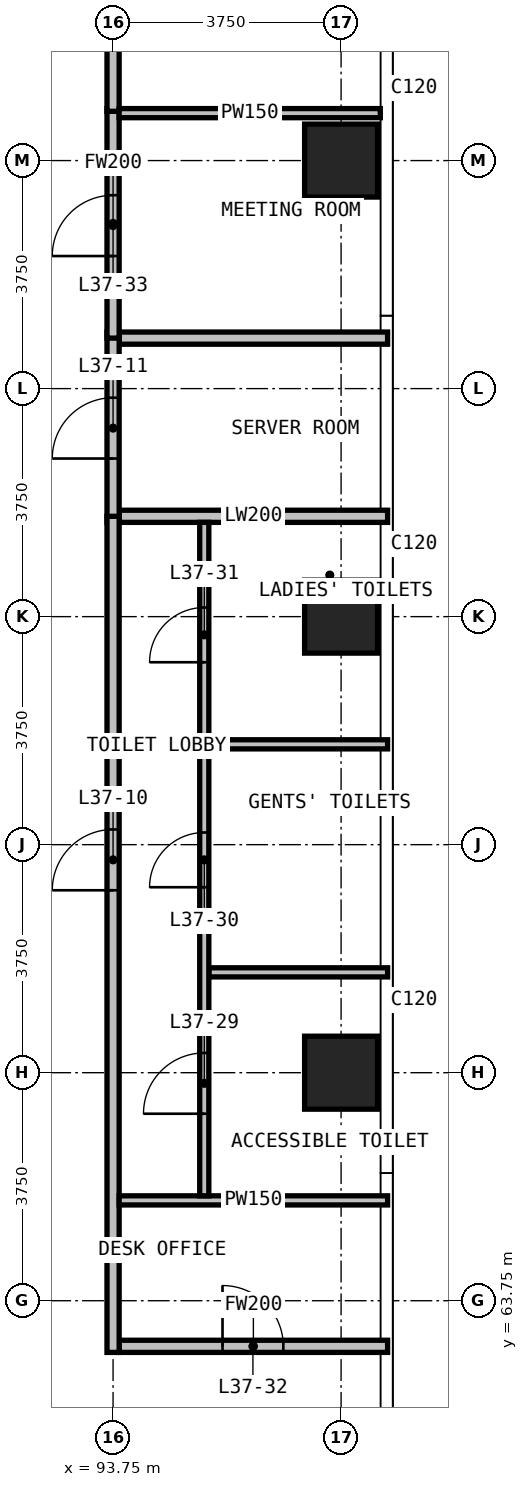
"""IFC4 building model, lengths in metres.
Left out: names, types, materials, properties, quantities, classifications, styles, units other than length and angle.
Written with IfcOpenShell. Run it as: python <this file> out.ifc"""

import sys

from ifc_helpers import new_model, si_unit, direction, frame, frame_2d, origin, origin_2d, place, context, subcontext, project, spatial, rectangle, extrude, element, fill, save


model = new_model("IFC4")
c1 = context("Model", 3, precision=1e-05, world=origin(), true_north=direction((0.0, 1.0)))
c2 = subcontext(c1, "Body", "Model", "MODEL_VIEW")
j1 = project(units=[si_unit("LENGTHUNIT", "METRE"), si_unit("PLANEANGLEUNIT", "RADIAN")], contexts=[c1])
p1 = place(None, origin())
s1 = spatial("IfcSite", under=j1, at=p1, CompositionType="ELEMENT")
p2 = place(p1, origin())
s2 = spatial("IfcBuilding", under=s1, at=p2, CompositionType="ELEMENT")
p3 = place(p2, frame((0.0, 0.0, 147.7)))
s3 = spatial("IfcBuildingStorey", under=s2, at=p3, CompositionType="ELEMENT", Elevation=147.7)
for number, where, z_axis, x_axis in (
    (1, (97.5, 67.5, 0.0), (0.0, 0.0, 1.0), (1.0, 0.0, 0.0)),
    (2, (97.5, 75.0, 0.0), (0.0, 0.0, 1.0), (1.0, 0.0, 0.0)),
    (3, (97.5, 82.5, 0.0), (0.0, 0.0, 1.0), (1.0, 0.0, 0.0)),
):
    element("IfcColumn", number, at=place(p3, frame(where, z_axis=z_axis, x_axis=x_axis)), inside=s3, PredefinedType="COLUMN", context=c2, shape_type="SweptSolid", body=[
        extrude(rectangle(XDim=1.2, YDim=1.2, at=origin_2d()), origin(), (0.0, 0.0, 1.0), 3.6),
    ])
for number, where, z_axis, x_axis in (
    (4, (93.85, 76.65, 0.0), (0.0, 0.0, 1.0), (1.0, 0.0, 0.0)),
    (5, (93.85, 79.58, 0.0), (0.0, 0.0, 1.0), (1.0, 0.0, 0.0)),
):
    element("IfcWall", number, at=place(p3, frame(where, z_axis=z_axis, x_axis=x_axis)), inside=s3, PredefinedType="PARTITIONING", context=c2, shape_type="SweptSolid", body=[
        extrude(rectangle(XDim=4.415, YDim=0.2, at=frame_2d((2.208, 0.0))), origin(), (0.0, 0.0, 1.0), 3.3),
    ])
p4 = place(p3, frame((93.75, 76.55, 0.0), z_axis=(0.0, 0.0, 1.0), x_axis=(0.0, 1.0, 0.0)))
e6 = element("IfcWall", 6, at=p4, inside=s3, PredefinedType="PARTITIONING", context=c2, shape_type="SweptSolid", body=[
    extrude(rectangle(XDim=3.13, YDim=0.2, at=frame_2d((1.565, 0.0))), origin(), (0.0, 0.0, 1.0), 3.3),
])
p5 = place(p4, frame((1.05, 0.0, 0.0)))
e7 = element("IfcOpeningElement", 7, at=p5, cuts=e6, PredefinedType="OPENING", context=c2, shape_type="SweptSolid", body=[
    extrude(rectangle(XDim=1.0, YDim=2.2, at=frame_2d((0.5, 1.1))), frame((0.0, 0.11, 0.0), z_axis=(0.0, -1.0, 0.0), x_axis=(1.0, 0.0, 0.0)), (0.0, 0.0, 1.0), 0.22),
])
p6 = place(p3, frame((93.85, 63.0, 0.0), z_axis=(0.0, 0.0, 1.0), x_axis=(1.0, 0.0, 0.0)))
e8 = element("IfcWall", 8, at=p6, inside=s3, PredefinedType="PARTITIONING", context=c2, shape_type="SweptSolid", body=[
    extrude(rectangle(XDim=4.415, YDim=0.2, at=frame_2d((2.208, 0.0))), origin(), (0.0, 0.0, 1.0), 3.3),
])
p7 = place(p6, frame((1.7, 0.0, 0.0)))
e9 = element("IfcOpeningElement", 9, at=p7, cuts=e8, PredefinedType="OPENING", context=c2, shape_type="SweptSolid", body=[
    extrude(rectangle(XDim=1.0, YDim=2.2, at=frame_2d((0.5, 1.1))), frame((0.0, 0.11, 0.0), z_axis=(0.0, -1.0, 0.0), x_axis=(1.0, 0.0, 0.0)), (0.0, 0.0, 1.0), 0.22),
])
p8 = place(p3, frame((93.75, 62.9, 0.0), z_axis=(0.0, 0.0, 1.0), x_axis=(0.0, 1.0, 0.0)))
e10 = element("IfcWall", 10, at=p8, inside=s3, PredefinedType="PARTITIONING", context=c2, shape_type="SweptSolid", body=[
    extrude(rectangle(XDim=13.75, YDim=0.2, at=frame_2d((6.875, 0.0))), origin(), (0.0, 0.0, 1.0), 3.3),
])
p9 = place(p8, frame((7.6, 0.0, 0.0)))
e11 = element("IfcOpeningElement", 11, at=p9, cuts=e10, PredefinedType="OPENING", context=c2, shape_type="SweptSolid", body=[
    extrude(rectangle(XDim=1.0, YDim=2.2, at=frame_2d((0.5, 1.1))), frame((0.0, 0.11, 0.0), z_axis=(0.0, -1.0, 0.0), x_axis=(1.0, 0.0, 0.0)), (0.0, 0.0, 1.0), 0.22),
])
p10 = place(p3, frame((93.75, 79.58, 0.0), z_axis=(0.0, 0.0, 1.0), x_axis=(0.0, 1.0, 0.0)))
e12 = element("IfcWall", 12, at=p10, inside=s3, PredefinedType="PARTITIONING", context=c2, shape_type="SweptSolid", body=[
    extrude(rectangle(XDim=3.775, YDim=0.2, at=frame_2d((1.887, 0.0))), origin(), (0.0, 0.0, 1.0), 3.3),
])
p11 = place(p10, frame((1.35, 0.0, 0.0)))
e13 = element("IfcOpeningElement", 13, at=p11, cuts=e12, PredefinedType="OPENING", context=c2, shape_type="SweptSolid", body=[
    extrude(rectangle(XDim=1.0, YDim=2.2, at=frame_2d((0.5, 1.1))), frame((0.0, 0.11, 0.0), z_axis=(0.0, -1.0, 0.0), x_axis=(1.0, 0.0, 0.0)), (0.0, 0.0, 1.0), 0.22),
])
p12 = place(p3, frame((93.75, 83.31, 0.0), z_axis=(0.0, 0.0, 1.0), x_axis=(0.0, 1.0, 0.0)))
e14 = element("IfcWall", 14, at=p12, inside=s3, PredefinedType="PARTITIONING", context=c2, shape_type="SweptSolid", body=[
    extrude(rectangle(XDim=7.335, YDim=0.2, at=frame_2d((3.667, 0.0))), origin(), (0.0, 0.0, 1.0), 3.3),
])
p13 = place(p3, frame((93.85, 65.4, 0.0), z_axis=(0.0, 0.0, 1.0), x_axis=(1.0, 0.0, 0.0)))
e15 = element("IfcWall", 15, at=p13, inside=s3, PredefinedType="PARTITIONING", context=c2, shape_type="SweptSolid", body=[
    extrude(rectangle(XDim=4.415, YDim=0.15, at=frame_2d((2.208, 0.0))), origin(), (0.0, 0.0, 1.0), 3.3),
])
for number, where, z_axis, x_axis in (
    (16, (95.325, 69.15, 0.0), (0.0, 0.0, 1.0), (1.0, 0.0, 0.0)),
    (17, (95.325, 72.9, 0.0), (0.0, 0.0, 1.0), (1.0, 0.0, 0.0)),
):
    element("IfcWall", number, at=place(p3, frame(where, z_axis=z_axis, x_axis=x_axis)), inside=s3, PredefinedType="PARTITIONING", context=c2, shape_type="SweptSolid", body=[
        extrude(rectangle(XDim=2.94, YDim=0.15, at=frame_2d((1.47, 0.0))), origin(), (0.0, 0.0, 1.0), 3.3),
    ])
p14 = place(p3, frame((93.85, 83.28, 0.0), z_axis=(0.0, 0.0, 1.0), x_axis=(1.0, 0.0, 0.0)))
e18 = element("IfcWall", 18, at=p14, inside=s3, PredefinedType="PARTITIONING", context=c2, shape_type="SweptSolid", body=[
    extrude(rectangle(XDim=4.295, YDim=0.15, at=frame_2d((2.147, 0.0))), origin(), (0.0, 0.0, 1.0), 3.3),
])
p15 = place(p3, frame((95.25, 65.475, 0.0), z_axis=(0.0, 0.0, 1.0), x_axis=(0.0, 1.0, 0.0)))
e19 = element("IfcWall", 19, at=p15, inside=s3, PredefinedType="PARTITIONING", context=c2, shape_type="SweptSolid", body=[
    extrude(rectangle(XDim=11.075, YDim=0.15, at=frame_2d((5.538, 0.0))), origin(), (0.0, 0.0, 1.0), 3.3),
])
p16 = place(p15, frame((1.35, 0.0, 0.0)))
e20 = element("IfcOpeningElement", 20, at=p16, cuts=e19, PredefinedType="OPENING", context=c2, shape_type="SweptSolid", body=[
    extrude(rectangle(XDim=1.0, YDim=2.2, at=frame_2d((0.5, 1.1))), frame((0.0, 0.085, 0.0), z_axis=(0.0, -1.0, 0.0), x_axis=(1.0, 0.0, 0.0)), (0.0, 0.0, 1.0), 0.17),
])
p17 = place(p15, frame((5.075, 0.0, 0.0)))
e21 = element("IfcOpeningElement", 21, at=p17, cuts=e19, PredefinedType="OPENING", context=c2, shape_type="SweptSolid", body=[
    extrude(rectangle(XDim=0.9, YDim=2.2, at=frame_2d((0.45, 1.1))), frame((0.0, 0.085, 0.0), z_axis=(0.0, -1.0, 0.0), x_axis=(1.0, 0.0, 0.0)), (0.0, 0.0, 1.0), 0.17),
])
p18 = place(p15, frame((8.775, 0.0, 0.0)))
e22 = element("IfcOpeningElement", 22, at=p18, cuts=e19, PredefinedType="OPENING", context=c2, shape_type="SweptSolid", body=[
    extrude(rectangle(XDim=0.9, YDim=2.2, at=frame_2d((0.45, 1.1))), frame((0.0, 0.085, 0.0), z_axis=(0.0, -1.0, 0.0), x_axis=(1.0, 0.0, 0.0)), (0.0, 0.0, 1.0), 0.17),
])
p19 = place(p9, origin())
e23 = element("IfcDoor", 23, at=p19, inside=s3, OperationType="SINGLE_SWING_RIGHT", PredefinedType="DOOR", context=c2, shape_type="SweptSolid", body=[
    extrude(rectangle(XDim=1.0, YDim=2.2, at=frame_2d((0.5, 1.1))), frame((0.0, 0.025, 0.0), z_axis=(0.0, -1.0, 0.0), x_axis=(1.0, 0.0, 0.0)), (0.0, 0.0, 1.0), 0.05),
])
fill(e11, e23)
p20 = place(p5, origin())
e24 = element("IfcDoor", 24, at=p20, inside=s3, OperationType="SINGLE_SWING_LEFT", PredefinedType="DOOR", context=c2, shape_type="SweptSolid", body=[
    extrude(rectangle(XDim=1.0, YDim=2.2, at=frame_2d((0.5, 1.1))), frame((0.0, 0.025, 0.0), z_axis=(0.0, -1.0, 0.0), x_axis=(1.0, 0.0, 0.0)), (0.0, 0.0, 1.0), 0.05),
])
fill(e7, e24)
p21 = place(p16, origin())
e25 = element("IfcDoor", 25, at=p21, inside=s3, OperationType="SINGLE_SWING_RIGHT", PredefinedType="DOOR", context=c2, shape_type="SweptSolid", body=[
    extrude(rectangle(XDim=1.0, YDim=2.2, at=frame_2d((0.5, 1.1))), frame((0.0, 0.025, 0.0), z_axis=(0.0, -1.0, 0.0), x_axis=(1.0, 0.0, 0.0)), (0.0, 0.0, 1.0), 0.05),
])
fill(e20, e25)
p22 = place(p17, origin())
e26 = element("IfcDoor", 26, at=p22, inside=s3, OperationType="SINGLE_SWING_RIGHT", PredefinedType="DOOR", context=c2, shape_type="SweptSolid", body=[
    extrude(rectangle(XDim=0.9, YDim=2.2, at=frame_2d((0.45, 1.1))), frame((0.0, 0.025, 0.0), z_axis=(0.0, -1.0, 0.0), x_axis=(1.0, 0.0, 0.0)), (0.0, 0.0, 1.0), 0.05),
])
fill(e21, e26)
p23 = place(p18, origin())
e27 = element("IfcDoor", 27, at=p23, inside=s3, OperationType="SINGLE_SWING_LEFT", PredefinedType="DOOR", context=c2, shape_type="SweptSolid", body=[
    extrude(rectangle(XDim=0.9, YDim=2.2, at=frame_2d((0.45, 1.1))), frame((0.0, 0.025, 0.0), z_axis=(0.0, -1.0, 0.0), x_axis=(1.0, 0.0, 0.0)), (0.0, 0.0, 1.0), 0.05),
])
fill(e22, e27)
p24 = place(p7, origin())
e28 = element("IfcDoor", 28, at=p24, inside=s3, OperationType="SINGLE_SWING_LEFT", PredefinedType="DOOR", context=c2, shape_type="SweptSolid", body=[
    extrude(rectangle(XDim=1.0, YDim=2.2, at=frame_2d((0.5, 1.1))), frame((0.0, 0.025, 0.0), z_axis=(0.0, -1.0, 0.0), x_axis=(1.0, 0.0, 0.0)), (0.0, 0.0, 1.0), 0.05),
])
fill(e9, e28)
p25 = place(p11, origin())
e29 = element("IfcDoor", 29, at=p25, inside=s3, OperationType="SINGLE_SWING_RIGHT", PredefinedType="DOOR", context=c2, shape_type="SweptSolid", body=[
    extrude(rectangle(XDim=1.0, YDim=2.2, at=frame_2d((0.5, 1.1))), frame((0.0, 0.025, 0.0), z_axis=(0.0, -1.0, 0.0), x_axis=(1.0, 0.0, 0.0)), (0.0, 0.0, 1.0), 0.05),
])
fill(e13, e29)
save(model, sys.argv[1])
